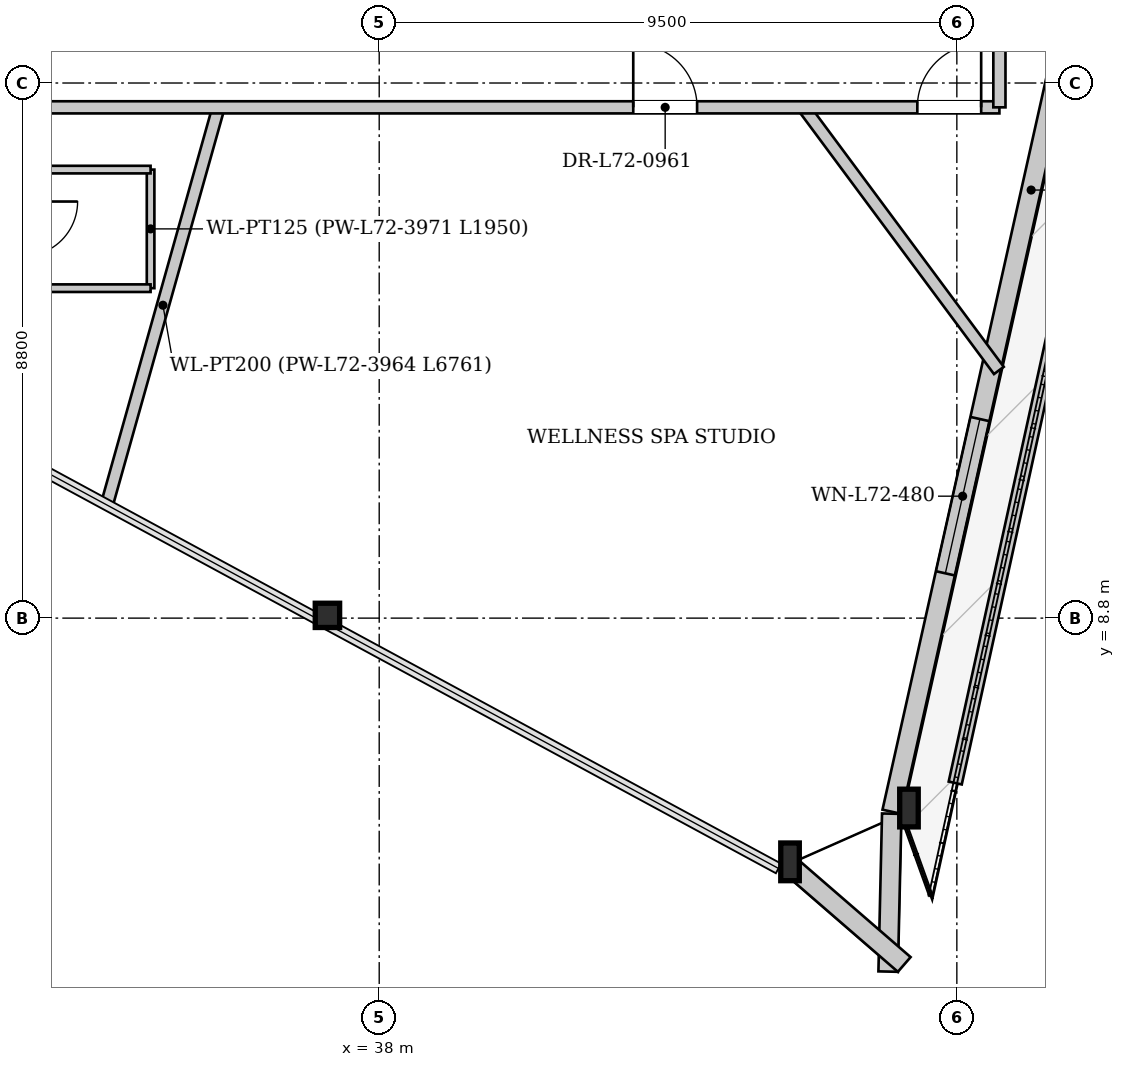
"""IFC4 building model, lengths in metres.
Left out: names, types, materials, properties, quantities, classifications, styles, units other than length and angle.
Written with IfcOpenShell. Run it as: python <this file> out.ifc"""

import sys

from ifc_helpers import new_model, si_unit, direction, frame, frame_2d, origin, origin_2d, place, context, subcontext, project, spatial, rectangle, i_section, extrude, source, transform, mapped, element, fill, save


model = new_model("IFC4")
c1 = context("Model", 3, precision=1e-05, world=origin(), true_north=direction((0.0, 1.0)))
c2 = subcontext(c1, "Body", "Model", "MODEL_VIEW")
j1 = project(units=[si_unit("LENGTHUNIT", "METRE"), si_unit("PLANEANGLEUNIT", "RADIAN")], contexts=[c1])
p1 = place(None, origin())
s1 = spatial("IfcSite", under=j1, at=p1, CompositionType="ELEMENT")
p2 = place(p1, origin())
s2 = spatial("IfcBuilding", under=s1, at=p2, CompositionType="ELEMENT")
p3 = place(p2, frame((0.0, 0.0, 270.5)))
s3 = spatial("IfcBuildingStorey", under=s2, at=p3, CompositionType="ELEMENT", Elevation=270.5)
m1 = source(origin(), c2, "Body", "SweptSolid", [
    extrude(i_section(OverallWidth=0.401, OverallDepth=0.399, WebThickness=0.022, FlangeThickness=0.034, at=origin_2d()), origin(), (0.0, 0.0, 1.0), 3.454),
])
p4 = place(p3, frame((36.978, 8.79, 0.0), z_axis=(0.098682547763, 0.032093034874, 0.994601323084), x_axis=(-0.30927090678, 0.950973977677, 0.0)))
e1 = element("IfcColumn", 1, at=p4, inside=s3, PredefinedType="COLUMN", context=c2, shape_type="MappedRepresentation", body=[
    mapped(m1, transform((0.0, 0.0, 0.0), x_axis=(1.0, 0.0, 0.0), y_axis=(0.0, 1.0, 0.0), z_axis=(0.0, 0.0, 1.0), scale=1.0)),
])
m2 = source(origin(), c2, "Body", "SweptSolid", [
    extrude(i_section(OverallWidth=0.305, OverallDepth=0.62, WebThickness=0.021, FlangeThickness=0.04, at=origin_2d()), origin(), (0.0, 0.0, 1.0), 3.463),
])
p5 = place(p3, frame((44.567, 4.684, 0.0), z_axis=(0.109634973435, 0.062537762982, 0.992002621368), x_axis=(-0.495477069619, 0.868621018328, 0.0)))
e2 = element("IfcColumn", 2, at=p5, inside=s3, PredefinedType="COLUMN", context=c2, shape_type="MappedRepresentation", body=[
    mapped(m2, transform((0.0, 0.0, 0.0), x_axis=(1.0, 0.0, 0.0), y_axis=(0.0, 1.0, 0.0), z_axis=(0.0, 0.0, 1.0), scale=1.0)),
])
m3 = source(origin(), c2, "Body", "SweptSolid", [
    extrude(i_section(OverallWidth=0.305, OverallDepth=0.62, WebThickness=0.021, FlangeThickness=0.04, at=origin_2d()), origin(), (0.0, 0.0, 1.0), 3.449),
])
p6 = place(p3, frame((46.59, 5.58, 0.0), z_axis=(0.071346276481, 0.056057788664, 0.995875109219), x_axis=(-0.617821551932, 0.786318338822, 0.0)))
e3 = element("IfcColumn", 3, at=p6, inside=s3, PredefinedType="COLUMN", context=c2, shape_type="MappedRepresentation", body=[
    mapped(m3, transform((0.0, 0.0, 0.0), x_axis=(1.0, 0.0, 0.0), y_axis=(0.0, 1.0, 0.0), z_axis=(0.0, 0.0, 1.0), scale=1.0)),
])
p7 = place(p3, frame((51.28, 27.266, 0.0), z_axis=(0.0, 0.0, 1.0), x_axis=(-0.218426207381, -0.975853468472, 0.0)))
e4 = element("IfcWall", 4, at=p7, inside=s3, PredefinedType="SOLIDWALL", context=c2, shape_type="SweptSolid", body=[
    extrude(rectangle(XDim=22.187, YDim=0.32, at=frame_2d((11.093, 0.0))), origin(), (0.0, 0.0, 1.0), 2.872),
])
p8 = place(p7, frame((6.35, 0.0, 0.0)))
e5 = element("IfcOpeningElement", 5, at=p8, cuts=e4, PredefinedType="OPENING", context=c2, shape_type="SweptSolid", body=[
    extrude(rectangle(XDim=1.5, YDim=2.3, at=frame_2d((0.75, 1.15))), frame((0.0, 0.17, 0.0), z_axis=(0.0, -1.0, 0.0), x_axis=(1.0, 0.0, 0.0)), (0.0, 0.0, 1.0), 0.34),
])
p9 = place(p7, frame((15.568, 0.0, 0.402)))
e6 = element("IfcOpeningElement", 6, at=p9, cuts=e4, PredefinedType="OPENING", context=c2, shape_type="SweptSolid", body=[
    extrude(rectangle(XDim=2.6, YDim=2.35, at=frame_2d((1.3, 1.175))), frame((0.0, 0.17, 0.0), z_axis=(0.0, -1.0, 0.0), x_axis=(1.0, 0.0, 0.0)), (0.0, 0.0, 1.0), 0.34),
])
for number, where, z_axis, x_axis in (
    (7, (46.429, 5.584, 0.0), (0.0, 0.0, 1.0), (-0.023, -1.0, 0.0)),
    (8, (46.635, 3.104, 0.0), (0.0, 0.0, 1.0), (-0.756, 0.655, 0.0)),
):
    element("IfcWall", number, at=place(p3, frame(where, z_axis=z_axis, x_axis=x_axis)), inside=s3, PredefinedType="SOLIDWALL", context=c2, shape_type="SweptSolid", body=[
        extrude(rectangle(XDim=2.597, YDim=0.32, at=frame_2d((1.299, 0.0))), origin(), (0.0, 0.0, 1.0), 2.872),
    ])
p10 = place(p3, frame((47.473, 6.088, 0.0), z_axis=(0.0, 0.0, 1.0), x_axis=(0.214309508329, 0.976765803373, 0.0)))
e9 = element("IfcWall", 9, at=p10, inside=s3, PredefinedType="PARAPET", context=c2, shape_type="SweptSolid", body=[
    extrude(rectangle(XDim=19.811, YDim=0.22, at=frame_2d((9.905, 0.0))), origin(), (0.0, 0.0, 1.0), 0.3),
])
p11 = place(p3, frame((35.358, 17.2, 0.0), z_axis=(0.0, 0.0, 1.0), x_axis=(-0.270598132861, -0.962692396611, 0.0)))
e10 = element("IfcWall", 10, at=p11, inside=s3, PredefinedType="PARTITIONING", context=c2, shape_type="SweptSolid", body=[
    extrude(rectangle(XDim=6.761, YDim=0.2, at=frame_2d((3.381, 0.0))), origin(), (0.0, 0.0, 1.0), 3.38),
])
p12 = place(p3, frame((44.979, 17.2, 0.0), z_axis=(0.0, 0.0, 1.0), x_axis=(0.596107962847, -0.802904288586, 0.0)))
e11 = element("IfcWall", 11, at=p12, inside=s3, PredefinedType="PARTITIONING", context=c2, shape_type="SweptSolid", body=[
    extrude(rectangle(XDim=5.389, YDim=0.2, at=frame_2d((2.695, 0.0))), origin(), (0.0, 0.0, 1.0), 3.38),
])
p13 = place(p3, frame((34.24, 14.226, 0.0), z_axis=(0.0, 0.0, 1.0), x_axis=(0.0, 1.0, 0.0)))
e12 = element("IfcWall", 12, at=p13, inside=s3, PredefinedType="PARTITIONING", context=c2, shape_type="SweptSolid", body=[
    extrude(rectangle(XDim=1.95, YDim=0.125, at=frame_2d((0.975, 0.0))), origin(), (0.0, 0.0, 1.0), 3.38),
])
for number, where, z_axis, x_axis in (
    (13, (34.24, 16.176, 0.0), (0.0, 0.0, 1.0), (-1.0, 0.0, 0.0)),
    (14, (32.14, 14.226, 0.0), (0.0, 0.0, 1.0), (1.0, 0.0, 0.0)),
):
    element("IfcWall", number, at=place(p3, frame(where, z_axis=z_axis, x_axis=x_axis)), inside=s3, PredefinedType="PARTITIONING", context=c2, shape_type="SweptSolid", body=[
        extrude(rectangle(XDim=2.1, YDim=0.125, at=frame_2d((1.05, 0.0))), origin(), (0.0, 0.0, 1.0), 3.38),
    ])
p14 = place(p3, frame((27.8, 17.2, 0.0), z_axis=(0.0, 0.0, 1.0), x_axis=(1.0, 0.0, 0.0)))
e15 = element("IfcWall", 15, at=p14, inside=s3, PredefinedType="PARTITIONING", context=c2, shape_type="SweptSolid", body=[
    extrude(rectangle(XDim=20.4, YDim=0.2, at=frame_2d((10.2, 0.0))), origin(), (0.0, 0.0, 1.0), 3.38),
])
p15 = place(p14, frame((14.378, 0.0, 0.0)))
e16 = element("IfcOpeningElement", 16, at=p15, cuts=e15, PredefinedType="OPENING", context=c2, shape_type="SweptSolid", body=[
    extrude(rectangle(XDim=1.05, YDim=2.2, at=frame_2d((0.525, 1.1))), frame((0.0, 0.11, 0.0), z_axis=(0.0, -1.0, 0.0), x_axis=(1.0, 0.0, 0.0)), (0.0, 0.0, 1.0), 0.22),
])
p16 = place(p14, frame((19.05, 0.0, 0.0)))
e17 = element("IfcOpeningElement", 17, at=p16, cuts=e15, PredefinedType="OPENING", context=c2, shape_type="SweptSolid", body=[
    extrude(rectangle(XDim=1.05, YDim=2.2, at=frame_2d((0.525, 1.1))), frame((0.0, 0.11, 0.0), z_axis=(0.0, -1.0, 0.0), x_axis=(1.0, 0.0, 0.0)), (0.0, 0.0, 1.0), 0.22),
])
p17 = place(p14, frame((1.241, 0.0, 0.0)))
e18 = element("IfcOpeningElement", 18, at=p17, cuts=e15, PredefinedType="OPENING", context=c2, shape_type="SweptSolid", body=[
    extrude(rectangle(XDim=1.05, YDim=2.2, at=frame_2d((0.525, 1.1))), frame((0.0, 0.11, 0.0), z_axis=(0.0, -1.0, 0.0), x_axis=(1.0, 0.0, 0.0)), (0.0, 0.0, 1.0), 0.22),
])
p18 = place(p3, frame((48.2, 17.2, 0.0), z_axis=(0.0, 0.0, 1.0), x_axis=(0.0, 1.0, 0.0)))
e19 = element("IfcWall", 19, at=p18, inside=s3, PredefinedType="PARTITIONING", context=c2, shape_type="SweptSolid", body=[
    extrude(rectangle(XDim=18.8, YDim=0.2, at=frame_2d((9.4, 0.0))), origin(), (0.0, 0.0, 1.0), 3.125),
])
m4 = source(origin(), c2, "Body", "SweptSolid", [
    extrude(rectangle(XDim=2.6, YDim=2.35, at=frame_2d((1.3, 1.175))), frame((0.0, 0.03, 0.0), z_axis=(0.0, -1.0, 0.0), x_axis=(1.0, 0.0, 0.0)), (0.0, 0.0, 1.0), 0.06),
])
p19 = place(p9, origin())
e20 = element("IfcWindow", 20, at=p19, inside=s3, PartitioningType="SINGLE_PANEL", PredefinedType="WINDOW", context=c2, shape_type="MappedRepresentation", body=[
    mapped(m4, transform((0.0, 0.0, 0.0), x_axis=(1.0, 0.0, 0.0), y_axis=(0.0, 1.0, 0.0), z_axis=(0.0, 0.0, 1.0), scale=1.0)),
])
fill(e6, e20)
m5 = source(origin(), c2, "Body", "SweptSolid", [
    extrude(rectangle(XDim=1.05, YDim=2.2, at=frame_2d((0.525, 1.1))), frame((0.0, 0.025, 0.0), z_axis=(0.0, -1.0, 0.0), x_axis=(1.0, 0.0, 0.0)), (0.0, 0.0, 1.0), 0.05),
])
p20 = place(p15, origin())
e21 = element("IfcDoor", 21, at=p20, inside=s3, OperationType="SINGLE_SWING_LEFT", PredefinedType="DOOR", context=c2, shape_type="MappedRepresentation", body=[
    mapped(m5, transform((0.0, 0.0, 0.0), x_axis=(1.0, 0.0, 0.0), y_axis=(0.0, 1.0, 0.0), z_axis=(0.0, 0.0, 1.0), scale=1.0)),
])
fill(e16, e21)
p21 = place(p16, origin())
e22 = element("IfcDoor", 22, at=p21, inside=s3, OperationType="SINGLE_SWING_RIGHT", PredefinedType="DOOR", context=c2, shape_type="MappedRepresentation", body=[
    mapped(m5, transform((0.0, 0.0, 0.0), x_axis=(1.0, 0.0, 0.0), y_axis=(0.0, 1.0, 0.0), z_axis=(0.0, 0.0, 1.0), scale=1.0)),
])
fill(e17, e22)
save(model, sys.argv[1])
